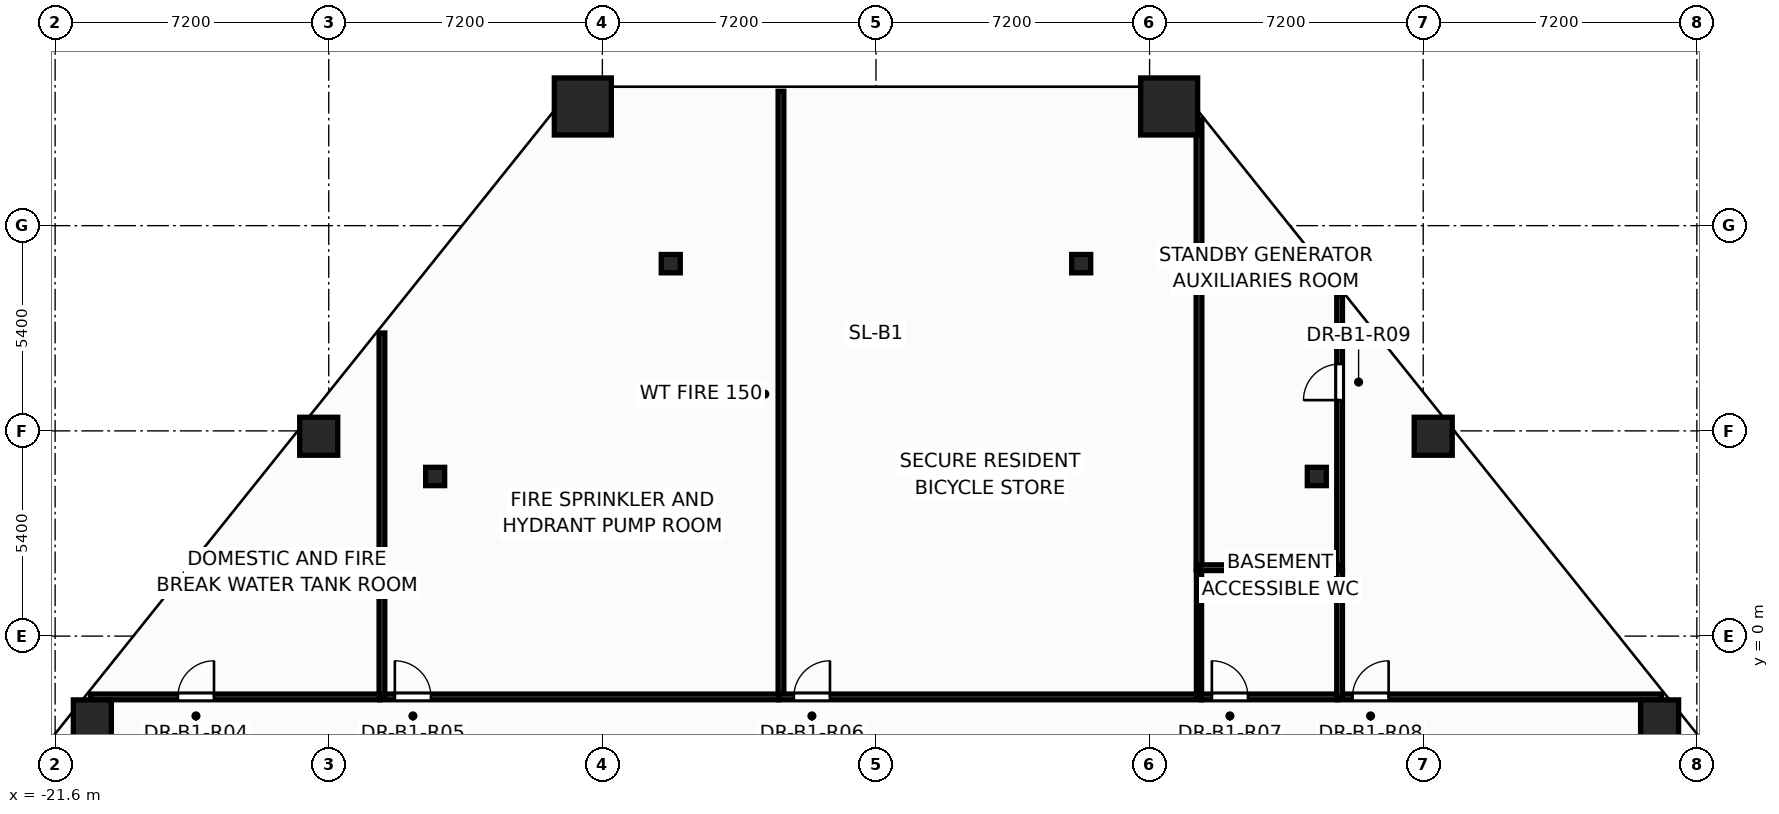
"""IFC4 building model, lengths in metres.
Left out: names, types, materials, properties, quantities, classifications, styles, units other than length and angle.
Written with IfcOpenShell. Run it as: python <this file> out.ifc"""

import sys

from ifc_helpers import new_model, si_unit, direction, frame, frame_2d, origin, origin_2d, place, context, subcontext, project, spatial, rectangle, hollow_rectangle, hollow_circle, i_section, extrude, element, fill, save


model = new_model("IFC4")
c1 = context("Model", 3, precision=1e-05, world=origin(), true_north=direction((0.0, 1.0)))
c2 = subcontext(c1, "Body", "Model", "MODEL_VIEW")
j1 = project(units=[si_unit("LENGTHUNIT", "METRE"), si_unit("PLANEANGLEUNIT", "RADIAN")], contexts=[c1])
p1 = place(None, origin())
s1 = spatial("IfcSite", under=j1, at=p1, CompositionType="ELEMENT")
p2 = place(p1, origin())
s2 = spatial("IfcBuilding", under=s1, at=p2, CompositionType="ELEMENT")
p3 = place(p2, frame((0.0, 0.0, -4.8)))
s3 = spatial("IfcBuildingStorey", under=s2, at=p3, CompositionType="ELEMENT", Elevation=-4.8)
for number, where, z_axis, x_axis in (
    (1, (7.714, 13.936, 0.0), (0.0, 0.0, 1.0), (1.0, 0.0, 0.0)),
    (2, (-7.714, 13.936, 0.0), (0.0, 0.0, 1.0), (1.0, 0.0, 0.0)),
):
    element("IfcColumn", number, at=place(p3, frame(where, z_axis=z_axis, x_axis=x_axis)), inside=s3, PredefinedType="COLUMN", context=c2, shape_type="SweptSolid", body=[
        extrude(hollow_rectangle(XDim=1.5, YDim=1.5, WallThickness=0.075, at=origin_2d()), origin(), (0.0, 0.0, 1.0), 4.8),
    ])
for number, where, z_axis, x_axis in (
    (3, (20.62, -2.179, 0.0), (0.0, 0.0, 1.0), (1.0, 0.0, 0.0)),
    (4, (14.664, 5.259, 0.0), (0.0, 0.0, 1.0), (1.0, 0.0, 0.0)),
    (5, (-14.664, 5.259, 0.0), (0.0, 0.0, 1.0), (1.0, 0.0, 0.0)),
    (6, (-20.62, -2.179, 0.0), (0.0, 0.0, 1.0), (1.0, 0.0, 0.0)),
):
    element("IfcColumn", number, at=place(p3, frame(where, z_axis=z_axis, x_axis=x_axis)), inside=s3, PredefinedType="COLUMN", context=c2, shape_type="SweptSolid", body=[
        extrude(hollow_circle(Radius=0.5, WallThickness=0.045, at=origin_2d()), origin(), (0.0, 0.0, 1.0), 4.8),
    ])
for number, where, z_axis, x_axis in (
    (7, (-11.6, 4.2, 0.0), (0.0, 0.0, 1.0), (1.0, 0.0, 0.0)),
    (8, (11.6, 4.2, 0.0), (0.0, 0.0, 1.0), (1.0, 0.0, 0.0)),
    (9, (-5.4, 9.8, 0.0), (0.0, 0.0, 1.0), (1.0, 0.0, 0.0)),
    (10, (5.4, 9.8, 0.0), (0.0, 0.0, 1.0), (1.0, 0.0, 0.0)),
):
    element("IfcColumn", number, at=place(p3, frame(where, z_axis=z_axis, x_axis=x_axis)), inside=s3, PredefinedType="COLUMN", context=c2, shape_type="SweptSolid", body=[
        extrude(i_section(OverallWidth=0.5, OverallDepth=0.482, WebThickness=0.04, FlangeThickness=0.045, at=origin_2d()), origin(), (0.0, 0.0, 1.0), 4.8),
    ])
p4 = place(p3, frame((-2.5, -1.6, 0.0), z_axis=(0.0, 0.0, 1.0), x_axis=(0.0, 1.0, 0.0)))
e11 = element("IfcWall", 11, at=p4, inside=s3, PredefinedType="PARTITIONING", context=c2, shape_type="SweptSolid", body=[
    extrude(rectangle(XDim=15.936, YDim=0.15, at=frame_2d((7.968, 0.0))), origin(), (0.0, 0.0, 1.0), 3.255),
])
p5 = place(p3, frame((8.5, 1.74, 0.0), z_axis=(0.0, 0.0, 1.0), x_axis=(0.0, 1.0, 0.0)))
e12 = element("IfcWall", 12, at=p5, inside=s3, PredefinedType="PARTITIONING", context=c2, shape_type="SweptSolid", body=[
    extrude(rectangle(XDim=11.855, YDim=0.15, at=frame_2d((5.927, 0.0))), origin(), (0.0, 0.0, 1.0), 3.255),
])
p6 = place(p3, frame((-2.56, -1.6, 0.0), z_axis=(0.0, 0.0, 1.0), x_axis=(1.0, 0.0, 0.0)))
e13 = element("IfcWall", 13, at=p6, inside=s3, PredefinedType="PARTITIONING", context=c2, shape_type="SweptSolid", body=[
    extrude(rectangle(XDim=11.12, YDim=0.15, at=frame_2d((5.56, 0.0))), origin(), (0.0, 0.0, 1.0), 4.48),
])
p7 = place(p6, frame((0.399, 0.0, 0.0)))
e14 = element("IfcOpeningElement", 14, at=p7, cuts=e13, PredefinedType="OPENING", context=c2, shape_type="SweptSolid", body=[
    extrude(rectangle(XDim=0.956, YDim=2.104, at=frame_2d((0.475, 1.052))), frame((0.0, 0.085, 0.0), z_axis=(0.0, -1.0, 0.0), x_axis=(1.0, 0.0, 0.0)), (0.0, 0.0, 1.0), 0.17),
])
p8 = place(p3, frame((-13.06, -1.6, 0.0), z_axis=(0.0, 0.0, 1.0), x_axis=(1.0, 0.0, 0.0)))
e15 = element("IfcWall", 15, at=p8, inside=s3, PredefinedType="PARTITIONING", context=c2, shape_type="SweptSolid", body=[
    extrude(rectangle(XDim=10.498, YDim=0.15, at=frame_2d((5.249, 0.0))), origin(), (0.0, 0.0, 1.0), 4.48),
])
p9 = place(p8, frame((0.4, 0.0, 0.0)))
e16 = element("IfcOpeningElement", 16, at=p9, cuts=e15, PredefinedType="OPENING", context=c2, shape_type="SweptSolid", body=[
    extrude(rectangle(XDim=0.956, YDim=2.104, at=frame_2d((0.475, 1.052))), frame((0.0, 0.085, 0.0), z_axis=(0.0, -1.0, 0.0), x_axis=(1.0, 0.0, 0.0)), (0.0, 0.0, 1.0), 0.17),
])
p10 = place(p3, frame((-13.0, -1.6, 0.0), z_axis=(0.0, 0.0, 1.0), x_axis=(0.0, 1.0, 0.0)))
e17 = element("IfcWall", 17, at=p10, inside=s3, PredefinedType="PARTITIONING", context=c2, shape_type="SweptSolid", body=[
    extrude(rectangle(XDim=9.576, YDim=0.15, at=frame_2d((4.788, 0.0))), origin(), (0.0, 0.0, 1.0), 3.547),
])
p11 = place(p3, frame((12.14, -1.6, 0.0), z_axis=(0.0, 0.0, 1.0), x_axis=(1.0, 0.0, 0.0)))
e18 = element("IfcWall", 18, at=p11, inside=s3, PredefinedType="PARTITIONING", context=c2, shape_type="SweptSolid", body=[
    extrude(rectangle(XDim=8.529, YDim=0.15, at=frame_2d((4.265, 0.0))), origin(), (0.0, 0.0, 1.0), 3.547),
])
p12 = place(p11, frame((0.4, 0.0, 0.0)))
e19 = element("IfcOpeningElement", 19, at=p12, cuts=e18, PredefinedType="OPENING", context=c2, shape_type="SweptSolid", body=[
    extrude(rectangle(XDim=0.956, YDim=2.104, at=frame_2d((0.475, 1.052))), frame((0.0, 0.085, 0.0), z_axis=(0.0, -1.0, 0.0), x_axis=(1.0, 0.0, 0.0)), (0.0, 0.0, 1.0), 0.17),
])
p13 = place(p3, frame((-20.669, -1.6, 0.0), z_axis=(0.0, 0.0, 1.0), x_axis=(1.0, 0.0, 0.0)))
e20 = element("IfcWall", 20, at=p13, inside=s3, PredefinedType="PARTITIONING", context=c2, shape_type="SweptSolid", body=[
    extrude(rectangle(XDim=7.607, YDim=0.15, at=frame_2d((3.804, 0.0))), origin(), (0.0, 0.0, 1.0), 3.547),
])
p14 = place(p13, frame((2.3, 0.0, 0.0)))
e21 = element("IfcOpeningElement", 21, at=p14, cuts=e20, PredefinedType="OPENING", context=c2, shape_type="SweptSolid", body=[
    extrude(rectangle(XDim=0.956, YDim=2.104, at=frame_2d((0.475, 1.052))), frame((0.0, 0.085, 0.0), z_axis=(0.0, -1.0, 0.0), x_axis=(1.0, 0.0, 0.0)), (0.0, 0.0, 1.0), 0.17),
])
p15 = place(p3, frame((12.2, 1.74, 0.0), z_axis=(0.0, 0.0, 1.0), x_axis=(0.0, 1.0, 0.0)))
e22 = element("IfcWall", 22, at=p15, inside=s3, PredefinedType="PARTITIONING", context=c2, shape_type="SweptSolid", body=[
    extrude(rectangle(XDim=7.235, YDim=0.15, at=frame_2d((3.617, 0.0))), origin(), (0.0, 0.0, 1.0), 3.547),
])
p16 = place(p15, frame((4.469, 0.0, 0.0)))
e23 = element("IfcOpeningElement", 23, at=p16, cuts=e22, PredefinedType="OPENING", context=c2, shape_type="SweptSolid", body=[
    extrude(rectangle(XDim=0.956, YDim=2.104, at=frame_2d((0.475, 1.052))), frame((0.0, 0.085, 0.0), z_axis=(0.0, -1.0, 0.0), x_axis=(1.0, 0.0, 0.0)), (0.0, 0.0, 1.0), 0.17),
])
p17 = place(p3, frame((8.562, -1.6, 0.0), z_axis=(0.0, 0.0, 1.0), x_axis=(1.0, 0.0, 0.0)))
e24 = element("IfcWall", 24, at=p17, inside=s3, PredefinedType="PARTITIONING", context=c2, shape_type="SweptSolid", body=[
    extrude(rectangle(XDim=3.576, YDim=0.15, at=frame_2d((1.788, 0.0))), origin(), (0.0, 0.0, 1.0), 4.48),
])
p18 = place(p17, frame((0.277, 0.0, 0.0)))
e25 = element("IfcOpeningElement", 25, at=p18, cuts=e24, PredefinedType="OPENING", context=c2, shape_type="SweptSolid", body=[
    extrude(rectangle(XDim=0.956, YDim=2.104, at=frame_2d((0.475, 1.052))), frame((0.0, 0.085, 0.0), z_axis=(0.0, -1.0, 0.0), x_axis=(1.0, 0.0, 0.0)), (0.0, 0.0, 1.0), 0.17),
])
p19 = place(p3, frame((8.5, 1.8, 0.0), z_axis=(0.0, 0.0, 1.0), x_axis=(1.0, 0.0, 0.0)))
e26 = element("IfcWall", 26, at=p19, inside=s3, PredefinedType="PARTITIONING", context=c2, shape_type="SweptSolid", body=[
    extrude(rectangle(XDim=3.7, YDim=0.15, at=frame_2d((1.85, 0.0))), origin(), (0.0, 0.0, 1.0), 4.48),
])
p20 = place(p3, frame((8.5, -1.6, 0.0), z_axis=(0.0, 0.0, 1.0), x_axis=(0.0, 1.0, 0.0)))
e27 = element("IfcWall", 27, at=p20, inside=s3, PredefinedType="PARTITIONING", context=c2, shape_type="SweptSolid", body=[
    extrude(rectangle(XDim=3.338, YDim=0.135, at=frame_2d((1.669, 0.0))), origin(), (0.0, 0.0, 1.0), 4.48),
])
p21 = place(p3, frame((12.2, -1.6, 0.0), z_axis=(0.0, 0.0, 1.0), x_axis=(0.0, 1.0, 0.0)))
e28 = element("IfcWall", 28, at=p21, inside=s3, PredefinedType="PARTITIONING", context=c2, shape_type="SweptSolid", body=[
    extrude(rectangle(XDim=3.338, YDim=0.15, at=frame_2d((1.669, 0.0))), origin(), (0.0, 0.0, 1.0), 4.48),
])
p22 = place(p14, origin())
e29 = element("IfcDoor", 29, at=p22, inside=s3, OperationType="SINGLE_SWING_RIGHT", PredefinedType="DOOR", context=c2, shape_type="SweptSolid", body=[
    extrude(rectangle(XDim=0.95, YDim=2.1, at=frame_2d((0.475, 1.05))), frame((0.0, 0.025, 0.0), z_axis=(0.0, -1.0, 0.0), x_axis=(1.0, 0.0, 0.0)), (0.0, 0.0, 1.0), 0.05),
])
fill(e21, e29)
p23 = place(p9, origin())
e30 = element("IfcDoor", 30, at=p23, inside=s3, OperationType="SINGLE_SWING_LEFT", PredefinedType="DOOR", context=c2, shape_type="SweptSolid", body=[
    extrude(rectangle(XDim=0.95, YDim=2.1, at=frame_2d((0.475, 1.05))), frame((0.0, 0.025, 0.0), z_axis=(0.0, -1.0, 0.0), x_axis=(1.0, 0.0, 0.0)), (0.0, 0.0, 1.0), 0.05),
])
fill(e16, e30)
p24 = place(p7, origin())
e31 = element("IfcDoor", 31, at=p24, inside=s3, OperationType="SINGLE_SWING_RIGHT", PredefinedType="DOOR", context=c2, shape_type="SweptSolid", body=[
    extrude(rectangle(XDim=0.95, YDim=2.1, at=frame_2d((0.475, 1.05))), frame((0.0, 0.025, 0.0), z_axis=(0.0, -1.0, 0.0), x_axis=(1.0, 0.0, 0.0)), (0.0, 0.0, 1.0), 0.05),
])
fill(e14, e31)
p25 = place(p18, origin())
e32 = element("IfcDoor", 32, at=p25, inside=s3, OperationType="SINGLE_SWING_LEFT", PredefinedType="DOOR", context=c2, shape_type="SweptSolid", body=[
    extrude(rectangle(XDim=0.95, YDim=2.1, at=frame_2d((0.475, 1.05))), frame((0.0, 0.025, 0.0), z_axis=(0.0, -1.0, 0.0), x_axis=(1.0, 0.0, 0.0)), (0.0, 0.0, 1.0), 0.05),
])
fill(e25, e32)
p26 = place(p12, origin())
e33 = element("IfcDoor", 33, at=p26, inside=s3, OperationType="SINGLE_SWING_RIGHT", PredefinedType="DOOR", context=c2, shape_type="SweptSolid", body=[
    extrude(rectangle(XDim=0.95, YDim=2.1, at=frame_2d((0.475, 1.05))), frame((0.0, 0.025, 0.0), z_axis=(0.0, -1.0, 0.0), x_axis=(1.0, 0.0, 0.0)), (0.0, 0.0, 1.0), 0.05),
])
fill(e19, e33)
p27 = place(p16, origin())
e34 = element("IfcDoor", 34, at=p27, inside=s3, OperationType="SINGLE_SWING_LEFT", PredefinedType="DOOR", context=c2, shape_type="SweptSolid", body=[
    extrude(rectangle(XDim=0.95, YDim=2.1, at=frame_2d((0.475, 1.05))), frame((0.0, 0.025, 0.0), z_axis=(0.0, -1.0, 0.0), x_axis=(1.0, 0.0, 0.0)), (0.0, 0.0, 1.0), 0.05),
])
fill(e23, e34)
save(model, sys.argv[1])
